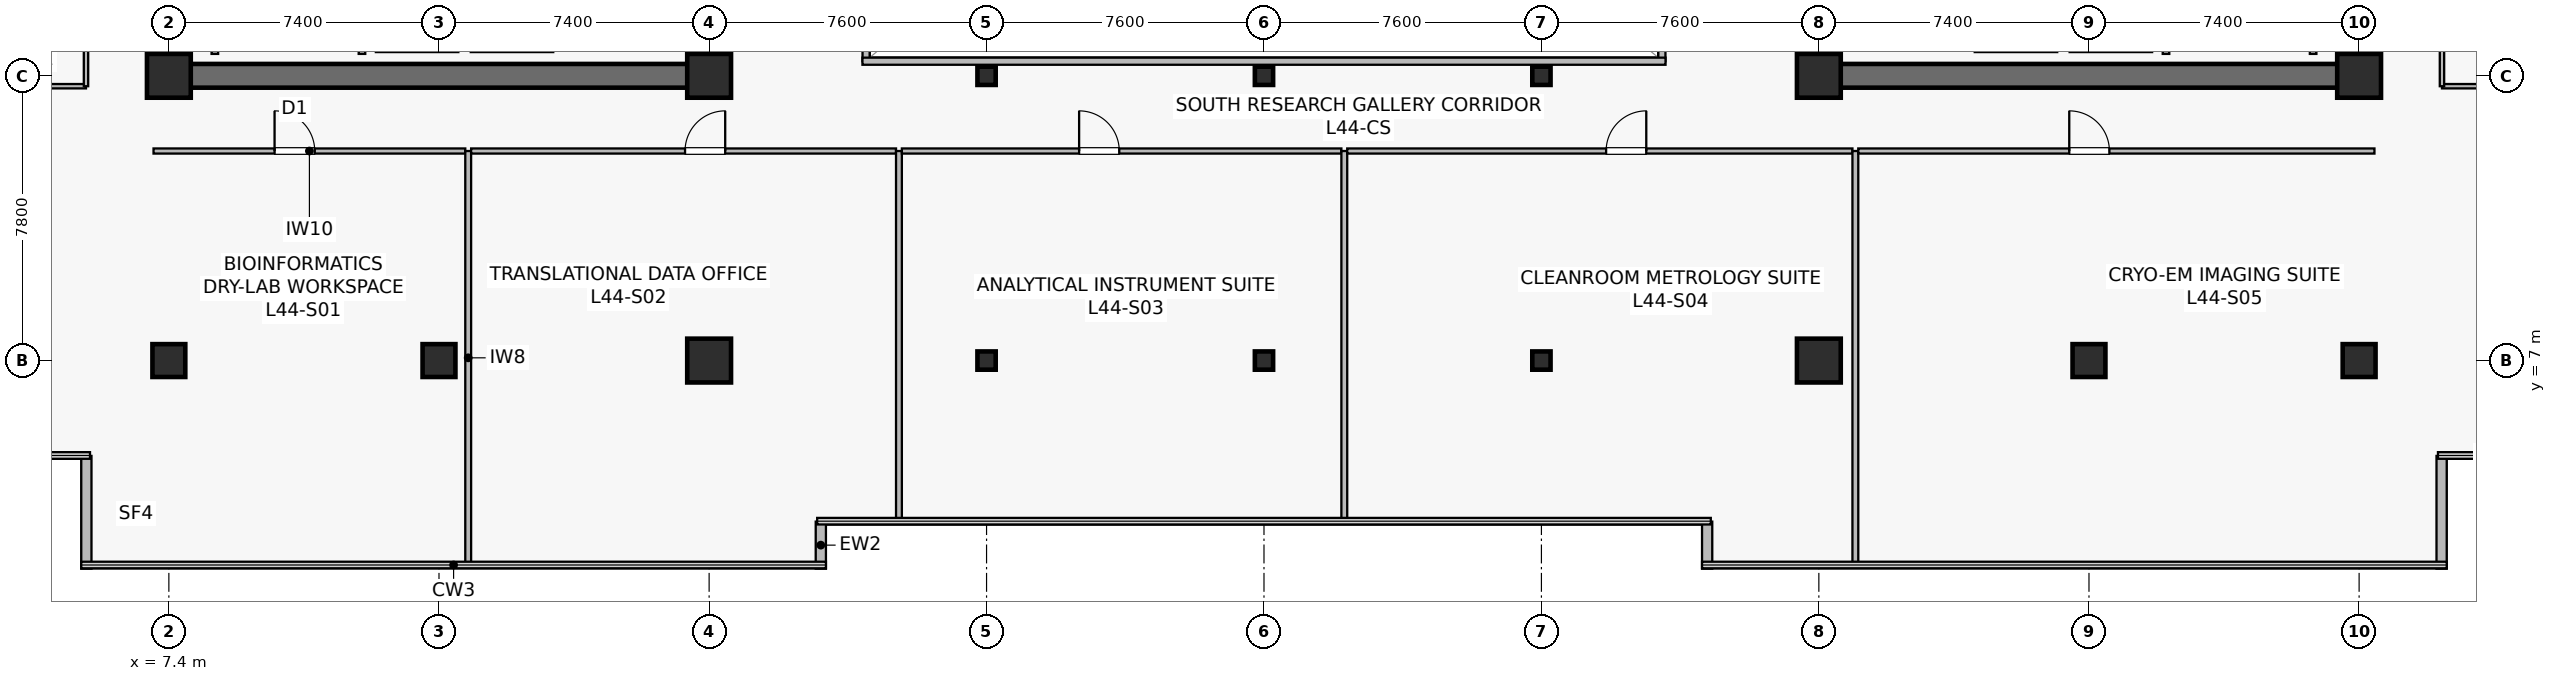
"""IFC4 building model, lengths in metres.
Left out: names, types, materials, properties, quantities, classifications, styles, units other than length and angle.
Written with IfcOpenShell. Run it as: python <this file> out.ifc"""

import sys

from ifc_helpers import new_model, si_unit, direction, frame, frame_2d, origin, origin_2d, place, context, subcontext, project, spatial, rectangle, hollow_rectangle, extrude, source, transform, mapped, element, fill, save


model = new_model("IFC4")
c1 = context("Model", 3, precision=1e-05, world=origin(), true_north=direction((0.0, 1.0)))
c2 = subcontext(c1, "Body", "Model", "MODEL_VIEW")
j1 = project(units=[si_unit("LENGTHUNIT", "METRE"), si_unit("PLANEANGLEUNIT", "RADIAN")], contexts=[c1])
p1 = place(None, origin())
s1 = spatial("IfcSite", under=j1, at=p1, CompositionType="ELEMENT")
p2 = place(p1, origin())
s2 = spatial("IfcBuilding", under=s1, at=p2, CompositionType="ELEMENT")
p3 = place(p2, frame((0.0, 0.0, 183.0)))
s3 = spatial("IfcBuildingStorey", under=s2, at=p3, CompositionType="ELEMENT", Elevation=183.0)
p4 = place(p3, frame((7.075, 14.8, 0.0), z_axis=(0.0, 0.0, 1.0), x_axis=(1.0, 0.0, 0.0)))
e1 = element("IfcWall", 1, at=p4, inside=s3, PredefinedType="SHEAR", context=c2, shape_type="SweptSolid", body=[
    extrude(rectangle(XDim=15.45, YDim=0.65, at=frame_2d((7.725, 0.0))), origin(), (0.0, 0.0, 1.0), 3.79),
])
p5 = place(p3, frame((7.4, 15.125, 0.0), z_axis=(0.0, 0.0, 1.0), x_axis=(0.0, 1.0, 0.0)))
e2 = element("IfcWall", 2, at=p5, inside=s3, PredefinedType="SHEAR", context=c2, shape_type="SweptSolid", body=[
    extrude(rectangle(XDim=18.35, YDim=0.65, at=frame_2d((9.175, 0.0))), origin(), (0.0, 0.0, 1.0), 3.79),
])
p6 = place(p3, frame((22.2, 15.125, 0.0), z_axis=(0.0, 0.0, 1.0), x_axis=(0.0, 1.0, 0.0)))
e3 = element("IfcWall", 3, at=p6, inside=s3, PredefinedType="SHEAR", context=c2, shape_type="SweptSolid", body=[
    extrude(rectangle(XDim=18.35, YDim=0.65, at=frame_2d((9.175, 0.0))), origin(), (0.0, 0.0, 1.0), 3.79),
])
p7 = place(p6, frame((3.425, 0.0, 0.0)))
e4 = element("IfcOpeningElement", 4, at=p7, cuts=e3, PredefinedType="OPENING", context=c2, shape_type="SweptSolid", body=[
    extrude(rectangle(XDim=1.42, YDim=2.2, at=frame_2d((0.71, 1.1))), frame((0.0, 0.335, 0.0), z_axis=(0.0, -1.0, 0.0), x_axis=(1.0, 0.0, 0.0)), (0.0, 0.0, 1.0), 0.67),
])
p8 = place(p3, frame((52.275, 14.8, 0.0), z_axis=(0.0, 0.0, 1.0), x_axis=(1.0, 0.0, 0.0)))
e5 = element("IfcWall", 5, at=p8, inside=s3, PredefinedType="SHEAR", context=c2, shape_type="SweptSolid", body=[
    extrude(rectangle(XDim=15.45, YDim=0.65, at=frame_2d((7.725, 0.0))), origin(), (0.0, 0.0, 1.0), 3.79),
])
p9 = place(p3, frame((52.6, 15.125, 0.0), z_axis=(0.0, 0.0, 1.0), x_axis=(0.0, 1.0, 0.0)))
e6 = element("IfcWall", 6, at=p9, inside=s3, PredefinedType="SHEAR", context=c2, shape_type="SweptSolid", body=[
    extrude(rectangle(XDim=18.35, YDim=0.65, at=frame_2d((9.175, 0.0))), origin(), (0.0, 0.0, 1.0), 3.79),
])
p10 = place(p9, frame((3.425, 0.0, 0.0)))
e7 = element("IfcOpeningElement", 7, at=p10, cuts=e6, PredefinedType="OPENING", context=c2, shape_type="SweptSolid", body=[
    extrude(rectangle(XDim=1.42, YDim=2.2, at=frame_2d((0.71, 1.1))), frame((0.0, 0.335, 0.0), z_axis=(0.0, -1.0, 0.0), x_axis=(1.0, 0.0, 0.0)), (0.0, 0.0, 1.0), 0.67),
])
p11 = place(p3, frame((67.4, 15.125, 0.0), z_axis=(0.0, 0.0, 1.0), x_axis=(0.0, 1.0, 0.0)))
e8 = element("IfcWall", 8, at=p11, inside=s3, PredefinedType="SHEAR", context=c2, shape_type="SweptSolid", body=[
    extrude(rectangle(XDim=18.35, YDim=0.65, at=frame_2d((9.175, 0.0))), origin(), (0.0, 0.0, 1.0), 3.79),
])
m1 = source(origin(), c2, "Body", "SweptSolid", [
    extrude(rectangle(XDim=0.9, YDim=0.9, at=origin_2d()), origin(), (0.0, 0.0, 1.0), 4.1),
])
p12 = place(p3, frame((14.8, 7.0, 0.0), z_axis=(0.0, 0.0, 1.0), x_axis=(1.0, 0.0, 0.0)))
e9 = element("IfcColumn", 9, at=p12, inside=s3, PredefinedType="COLUMN", context=c2, shape_type="MappedRepresentation", body=[
    mapped(m1, transform((0.0, 0.0, 0.0), scale=1.0)),
])
m2 = source(origin(), c2, "Body", "SweptSolid", [
    extrude(rectangle(XDim=1.2, YDim=1.2, at=origin_2d()), origin(), (0.0, 0.0, 1.0), 4.1),
])
for number, where, z_axis, x_axis in (
    (10, (22.2, 7.0, 0.0), (0.0, 0.0, 1.0), (1.0, 0.0, 0.0)),
    (11, (7.4, 14.8, 0.0), (0.0, 0.0, 1.0), (1.0, 0.0, 0.0)),
    (12, (22.2, 14.8, 0.0), (0.0, 0.0, 1.0), (1.0, 0.0, 0.0)),
    (13, (52.6, 7.0, 0.0), (0.0, 0.0, 1.0), (1.0, 0.0, 0.0)),
):
    element("IfcColumn", number, at=place(p3, frame(where, z_axis=z_axis, x_axis=x_axis)), inside=s3, PredefinedType="COLUMN", context=c2, shape_type="MappedRepresentation", body=[
        mapped(m2, transform((0.0, 0.0, 0.0), scale=1.0)),
    ])
p13 = place(p3, frame((60.0, 7.0, 0.0), z_axis=(0.0, 0.0, 1.0), x_axis=(1.0, 0.0, 0.0)))
e14 = element("IfcColumn", 14, at=p13, inside=s3, PredefinedType="COLUMN", context=c2, shape_type="MappedRepresentation", body=[
    mapped(m1, transform((0.0, 0.0, 0.0), scale=1.0)),
])
for number, where, z_axis, x_axis in (
    (15, (52.6, 14.8, 0.0), (0.0, 0.0, 1.0), (1.0, 0.0, 0.0)),
    (16, (67.4, 14.8, 0.0), (0.0, 0.0, 1.0), (1.0, 0.0, 0.0)),
):
    element("IfcColumn", number, at=place(p3, frame(where, z_axis=z_axis, x_axis=x_axis)), inside=s3, PredefinedType="COLUMN", context=c2, shape_type="MappedRepresentation", body=[
        mapped(m2, transform((0.0, 0.0, 0.0), scale=1.0)),
    ])
for number, where, z_axis, x_axis in (
    (17, (7.4, 7.0, 0.0), (0.0, 0.0, 1.0), (1.0, 0.0, 0.0)),
    (18, (67.4, 7.0, 0.0), (0.0, 0.0, 1.0), (1.0, 0.0, 0.0)),
):
    element("IfcColumn", number, at=place(p3, frame(where, z_axis=z_axis, x_axis=x_axis)), inside=s3, PredefinedType="COLUMN", context=c2, shape_type="MappedRepresentation", body=[
        mapped(m1, transform((0.0, 0.0, 0.0), scale=1.0)),
    ])
m3 = source(origin(), c2, "Body", "SweptSolid", [
    extrude(hollow_rectangle(XDim=0.5, YDim=0.5, WallThickness=0.022, at=origin_2d()), origin(), (0.0, 0.0, 1.0), 4.1),
])
for number, where, z_axis, x_axis in (
    (19, (29.8, 7.0, 0.0), (0.0, 0.0, 1.0), (1.0, 0.0, 0.0)),
    (20, (29.8, 14.8, 0.0), (0.0, 0.0, 1.0), (1.0, 0.0, 0.0)),
    (21, (37.4, 7.0, 0.0), (0.0, 0.0, 1.0), (1.0, 0.0, 0.0)),
    (22, (37.4, 14.8, 0.0), (0.0, 0.0, 1.0), (1.0, 0.0, 0.0)),
    (23, (45.0, 7.0, 0.0), (0.0, 0.0, 1.0), (1.0, 0.0, 0.0)),
    (24, (45.0, 14.8, 0.0), (0.0, 0.0, 1.0), (1.0, 0.0, 0.0)),
):
    element("IfcColumn", number, at=place(p3, frame(where, z_axis=z_axis, x_axis=x_axis)), inside=s3, PredefinedType="COLUMN", context=c2, shape_type="MappedRepresentation", body=[
        mapped(m3, transform((0.0, 0.0, 0.0), scale=1.0)),
    ])
for number, where, z_axis, x_axis in (
    (25, (25.26, 1.3, 0.0), (0.0, 0.0, 1.0), (0.0, 1.0, 0.0)),
    (26, (49.54, 2.588, 0.0), (0.0, 0.0, 1.0), (0.0, -1.0, 0.0)),
):
    element("IfcWall", number, at=place(p3, frame(where, z_axis=z_axis, x_axis=x_axis)), inside=s3, PredefinedType="STANDARD", context=c2, shape_type="SweptSolid", body=[
        extrude(rectangle(XDim=1.288, YDim=0.28, at=frame_2d((0.644, 0.0))), origin(), (0.0, 0.0, 1.0), 3.79),
    ])
for number, where, z_axis, x_axis in (
    (27, (69.66, 1.3, 0.0), (0.0, 0.0, 1.0), (0.0, 1.0, 0.0)),
    (28, (5.14, 4.388, 0.0), (0.0, 0.0, 1.0), (0.0, -1.0, 0.0)),
):
    element("IfcWall", number, at=place(p3, frame(where, z_axis=z_axis, x_axis=x_axis)), inside=s3, PredefinedType="STANDARD", context=c2, shape_type="SweptSolid", body=[
        extrude(rectangle(XDim=3.088, YDim=0.28, at=frame_2d((1.544, 0.0))), origin(), (0.0, 0.0, 1.0), 3.79),
    ])
p14 = place(p3, frame((13.07, 15.55, 0.0), z_axis=(0.0, 0.0, 1.0), x_axis=(1.0, 0.0, 0.0)))
e29 = element("IfcWall", 29, at=p14, inside=s3, PredefinedType="SOLIDWALL", context=c2, shape_type="SweptSolid", body=[
    extrude(rectangle(XDim=2.26, YDim=0.2, at=frame_2d((1.13, 0.0))), origin(), (0.0, 0.0, 1.0), 3.187),
])
p15 = place(p3, frame((15.67, 15.55, 0.0), z_axis=(0.0, 0.0, 1.0), x_axis=(1.0, 0.0, 0.0)))
e30 = element("IfcWall", 30, at=p15, inside=s3, PredefinedType="SOLIDWALL", context=c2, shape_type="SweptSolid", body=[
    extrude(rectangle(XDim=2.26, YDim=0.2, at=frame_2d((1.13, 0.0))), origin(), (0.0, 0.0, 1.0), 3.79),
])
for number, where, z_axis, x_axis in (
    (31, (12.69, 15.4, 0.0), (0.0, 0.0, 1.0), (0.0, 1.0, 0.0)),
    (32, (8.66, 15.4, 0.0), (0.0, 0.0, 1.0), (0.0, 1.0, 0.0)),
):
    element("IfcWall", number, at=place(p3, frame(where, z_axis=z_axis, x_axis=x_axis)), inside=s3, PredefinedType="SOLIDWALL", context=c2, shape_type="SweptSolid", body=[
        extrude(rectangle(XDim=2.4, YDim=0.18, at=frame_2d((1.2, 0.0))), origin(), (0.0, 0.0, 1.0), 3.79),
    ])
p16 = place(p3, frame((59.47, 15.55, 0.0), z_axis=(0.0, 0.0, 1.0), x_axis=(1.0, 0.0, 0.0)))
e33 = element("IfcWall", 33, at=p16, inside=s3, PredefinedType="SOLIDWALL", context=c2, shape_type="SweptSolid", body=[
    extrude(rectangle(XDim=2.26, YDim=0.2, at=frame_2d((1.13, 0.0))), origin(), (0.0, 0.0, 1.0), 3.187),
])
p17 = place(p3, frame((56.87, 15.55, 0.0), z_axis=(0.0, 0.0, 1.0), x_axis=(1.0, 0.0, 0.0)))
e34 = element("IfcWall", 34, at=p17, inside=s3, PredefinedType="SOLIDWALL", context=c2, shape_type="SweptSolid", body=[
    extrude(rectangle(XDim=2.26, YDim=0.2, at=frame_2d((1.13, 0.0))), origin(), (0.0, 0.0, 1.0), 3.79),
])
for number, where, z_axis, x_axis in (
    (35, (62.11, 15.4, 0.0), (0.0, 0.0, 1.0), (0.0, 1.0, 0.0)),
    (36, (66.14, 15.4, 0.0), (0.0, 0.0, 1.0), (0.0, 1.0, 0.0)),
):
    element("IfcWall", number, at=place(p3, frame(where, z_axis=z_axis, x_axis=x_axis)), inside=s3, PredefinedType="SOLIDWALL", context=c2, shape_type="SweptSolid", body=[
        extrude(rectangle(XDim=2.4, YDim=0.18, at=frame_2d((1.2, 0.0))), origin(), (0.0, 0.0, 1.0), 3.79),
    ])
p18 = place(p3, frame((26.5, 15.2, 0.0), z_axis=(0.0, 0.0, 1.0), x_axis=(0.0, 1.0, 0.0)))
e37 = element("IfcWall", 37, at=p18, inside=s3, PredefinedType="SOLIDWALL", context=c2, shape_type="SweptSolid", body=[
    extrude(rectangle(XDim=18.2, YDim=0.195, at=frame_2d((9.1, 0.0))), origin(), (0.0, 0.0, 1.0), 3.79),
])
p19 = place(p18, frame((1.8, 0.0, 0.9)))
e38 = element("IfcOpeningElement", 38, at=p19, cuts=e37, PredefinedType="OPENING", context=c2, shape_type="SweptSolid", body=[
    extrude(rectangle(XDim=1.5, YDim=1.4, at=frame_2d((0.75, 0.7))), frame((0.0, 0.107, 0.0), z_axis=(0.0, -1.0, 0.0), x_axis=(1.0, 0.0, 0.0)), (0.0, 0.0, 1.0), 0.215),
])
p20 = place(p18, frame((13.2, 0.0, 0.9)))
e39 = element("IfcOpeningElement", 39, at=p20, cuts=e37, PredefinedType="OPENING", context=c2, shape_type="SweptSolid", body=[
    extrude(rectangle(XDim=1.5, YDim=1.4, at=frame_2d((0.75, 0.7))), frame((0.0, 0.107, 0.0), z_axis=(0.0, -1.0, 0.0), x_axis=(1.0, 0.0, 0.0)), (0.0, 0.0, 1.0), 0.215),
])
p21 = place(p3, frame((48.3, 15.2, 0.0), z_axis=(0.0, 0.0, 1.0), x_axis=(0.0, 1.0, 0.0)))
e40 = element("IfcWall", 40, at=p21, inside=s3, PredefinedType="SOLIDWALL", context=c2, shape_type="SweptSolid", body=[
    extrude(rectangle(XDim=18.2, YDim=0.195, at=frame_2d((9.1, 0.0))), origin(), (0.0, 0.0, 1.0), 3.79),
])
p22 = place(p21, frame((1.8, 0.0, 0.9)))
e41 = element("IfcOpeningElement", 41, at=p22, cuts=e40, PredefinedType="OPENING", context=c2, shape_type="SweptSolid", body=[
    extrude(rectangle(XDim=1.5, YDim=1.4, at=frame_2d((0.75, 0.7))), frame((0.0, 0.107, 0.0), z_axis=(0.0, -1.0, 0.0), x_axis=(1.0, 0.0, 0.0)), (0.0, 0.0, 1.0), 0.215),
])
p23 = place(p21, frame((13.2, 0.0, 0.9)))
e42 = element("IfcOpeningElement", 42, at=p23, cuts=e40, PredefinedType="OPENING", context=c2, shape_type="SweptSolid", body=[
    extrude(rectangle(XDim=1.5, YDim=1.4, at=frame_2d((0.75, 0.7))), frame((0.0, 0.107, 0.0), z_axis=(0.0, -1.0, 0.0), x_axis=(1.0, 0.0, 0.0)), (0.0, 0.0, 1.0), 0.215),
])
p24 = place(p3, frame((26.4, 15.2, 0.0), z_axis=(0.0, 0.0, 1.0), x_axis=(1.0, 0.0, 0.0)))
e43 = element("IfcWall", 43, at=p24, inside=s3, PredefinedType="SOLIDWALL", context=c2, shape_type="SweptSolid", body=[
    extrude(rectangle(XDim=22.0, YDim=0.195, at=frame_2d((11.0, 0.0))), origin(), (0.0, 0.0, 1.0), 3.79),
])
p25 = place(p3, frame((6.98, 12.74, 0.0), z_axis=(0.0, 0.0, 1.0), x_axis=(1.0, 0.0, 0.0)))
e44 = element("IfcWall", 44, at=p25, inside=s3, PredefinedType="PARTITIONING", context=c2, shape_type="SweptSolid", body=[
    extrude(rectangle(XDim=8.54, YDim=0.14, at=frame_2d((4.27, 0.0))), origin(), (0.0, 0.0, 1.0), 3.187),
])
p26 = place(p25, frame((3.316, 0.0, 0.0)))
e45 = element("IfcOpeningElement", 45, at=p26, cuts=e44, PredefinedType="OPENING", context=c2, shape_type="SweptSolid", body=[
    extrude(rectangle(XDim=1.1, YDim=2.18, at=frame_2d((0.55, 1.09))), frame((0.0, 0.08, 0.0), z_axis=(0.0, -1.0, 0.0), x_axis=(1.0, 0.0, 0.0)), (0.0, 0.0, 1.0), 0.16),
])
p27 = place(p3, frame((15.6, 1.41, 0.0), z_axis=(0.0, 0.0, 1.0), x_axis=(0.0, 1.0, 0.0)))
e46 = element("IfcWall", 46, at=p27, inside=s3, PredefinedType="PARTITIONING", context=c2, shape_type="SweptSolid", body=[
    extrude(rectangle(XDim=11.33, YDim=0.16, at=frame_2d((5.665, 0.0))), origin(), (0.0, 0.0, 1.0), 3.075),
])
p28 = place(p3, frame((15.68, 12.74, 0.0), z_axis=(0.0, 0.0, 1.0), x_axis=(1.0, 0.0, 0.0)))
e47 = element("IfcWall", 47, at=p28, inside=s3, PredefinedType="PARTITIONING", context=c2, shape_type="SweptSolid", body=[
    extrude(rectangle(XDim=11.64, YDim=0.14, at=frame_2d((5.82, 0.0))), origin(), (0.0, 0.0, 1.0), 3.187),
])
p29 = place(p28, frame((5.86, 0.0, 0.0)))
e48 = element("IfcOpeningElement", 48, at=p29, cuts=e47, PredefinedType="OPENING", context=c2, shape_type="SweptSolid", body=[
    extrude(rectangle(XDim=1.1, YDim=2.18, at=frame_2d((0.55, 1.09))), frame((0.0, 0.08, 0.0), z_axis=(0.0, -1.0, 0.0), x_axis=(1.0, 0.0, 0.0)), (0.0, 0.0, 1.0), 0.16),
])
p30 = place(p3, frame((27.4, 2.61, 0.0), z_axis=(0.0, 0.0, 1.0), x_axis=(0.0, 1.0, 0.0)))
e49 = element("IfcWall", 49, at=p30, inside=s3, PredefinedType="PARTITIONING", context=c2, shape_type="SweptSolid", body=[
    extrude(rectangle(XDim=10.13, YDim=0.16, at=frame_2d((5.065, 0.0))), origin(), (0.0, 0.0, 1.0), 3.075),
])
p31 = place(p3, frame((27.48, 12.74, 0.0), z_axis=(0.0, 0.0, 1.0), x_axis=(1.0, 0.0, 0.0)))
e50 = element("IfcWall", 50, at=p31, inside=s3, PredefinedType="PARTITIONING", context=c2, shape_type="SweptSolid", body=[
    extrude(rectangle(XDim=12.04, YDim=0.14, at=frame_2d((6.02, 0.0))), origin(), (0.0, 0.0, 1.0), 3.187),
])
p32 = place(p31, frame((4.856, 0.0, 0.0)))
e51 = element("IfcOpeningElement", 51, at=p32, cuts=e50, PredefinedType="OPENING", context=c2, shape_type="SweptSolid", body=[
    extrude(rectangle(XDim=1.1, YDim=2.18, at=frame_2d((0.55, 1.09))), frame((0.0, 0.08, 0.0), z_axis=(0.0, -1.0, 0.0), x_axis=(1.0, 0.0, 0.0)), (0.0, 0.0, 1.0), 0.16),
])
p33 = place(p3, frame((39.6, 2.61, 0.0), z_axis=(0.0, 0.0, 1.0), x_axis=(0.0, 1.0, 0.0)))
e52 = element("IfcWall", 52, at=p33, inside=s3, PredefinedType="PARTITIONING", context=c2, shape_type="SweptSolid", body=[
    extrude(rectangle(XDim=10.13, YDim=0.16, at=frame_2d((5.065, 0.0))), origin(), (0.0, 0.0, 1.0), 3.075),
])
p34 = place(p3, frame((39.68, 12.74, 0.0), z_axis=(0.0, 0.0, 1.0), x_axis=(1.0, 0.0, 0.0)))
e53 = element("IfcWall", 53, at=p34, inside=s3, PredefinedType="PARTITIONING", context=c2, shape_type="SweptSolid", body=[
    extrude(rectangle(XDim=13.84, YDim=0.14, at=frame_2d((6.92, 0.0))), origin(), (0.0, 0.0, 1.0), 3.187),
])
p35 = place(p34, frame((7.092, 0.0, 0.0)))
e54 = element("IfcOpeningElement", 54, at=p35, cuts=e53, PredefinedType="OPENING", context=c2, shape_type="SweptSolid", body=[
    extrude(rectangle(XDim=1.1, YDim=2.18, at=frame_2d((0.55, 1.09))), frame((0.0, 0.08, 0.0), z_axis=(0.0, -1.0, 0.0), x_axis=(1.0, 0.0, 0.0)), (0.0, 0.0, 1.0), 0.16),
])
p36 = place(p3, frame((53.6, 1.41, 0.0), z_axis=(0.0, 0.0, 1.0), x_axis=(0.0, 1.0, 0.0)))
e55 = element("IfcWall", 55, at=p36, inside=s3, PredefinedType="PARTITIONING", context=c2, shape_type="SweptSolid", body=[
    extrude(rectangle(XDim=11.33, YDim=0.16, at=frame_2d((5.665, 0.0))), origin(), (0.0, 0.0, 1.0), 3.075),
])
p37 = place(p3, frame((53.68, 12.74, 0.0), z_axis=(0.0, 0.0, 1.0), x_axis=(1.0, 0.0, 0.0)))
e56 = element("IfcWall", 56, at=p37, inside=s3, PredefinedType="PARTITIONING", context=c2, shape_type="SweptSolid", body=[
    extrude(rectangle(XDim=14.14, YDim=0.14, at=frame_2d((7.07, 0.0))), origin(), (0.0, 0.0, 1.0), 3.187),
])
p38 = place(p37, frame((5.78, 0.0, 0.0)))
e57 = element("IfcOpeningElement", 57, at=p38, cuts=e56, PredefinedType="OPENING", context=c2, shape_type="SweptSolid", body=[
    extrude(rectangle(XDim=1.1, YDim=2.18, at=frame_2d((0.55, 1.09))), frame((0.0, 0.08, 0.0), z_axis=(0.0, -1.0, 0.0), x_axis=(1.0, 0.0, 0.0)), (0.0, 0.0, 1.0), 0.16),
])
p39 = place(p3, frame((2.11, 14.515, 0.0), z_axis=(0.0, 0.0, 1.0), x_axis=(1.0, 0.0, 0.0)))
e58 = element("IfcWall", 58, at=p39, inside=s3, PredefinedType="PARTITIONING", context=c2, shape_type="SweptSolid", body=[
    extrude(rectangle(XDim=3.02, YDim=0.12, at=frame_2d((1.51, 0.0))), origin(), (0.0, 0.0, 1.0), 3.79),
])
p40 = place(p3, frame((5.13, 14.515, 0.0), z_axis=(0.0, 0.0, 1.0), x_axis=(0.0, 1.0, 0.0)))
e59 = element("IfcWall", 59, at=p40, inside=s3, PredefinedType="PARTITIONING", context=c2, shape_type="SweptSolid", body=[
    extrude(rectangle(XDim=19.57, YDim=0.12, at=frame_2d((9.785, 0.0))), origin(), (0.0, 0.0, 1.0), 3.79),
])
p41 = place(p40, frame((9.335, 0.0, 0.0)))
e60 = element("IfcOpeningElement", 60, at=p41, cuts=e59, PredefinedType="OPENING", context=c2, shape_type="SweptSolid", body=[
    extrude(rectangle(XDim=0.9, YDim=2.1, at=frame_2d((0.45, 1.05))), frame((0.0, 0.07, 0.0), z_axis=(0.0, -1.0, 0.0), x_axis=(1.0, 0.0, 0.0)), (0.0, 0.0, 1.0), 0.14),
])
p42 = place(p3, frame((69.67, 14.515, 0.0), z_axis=(0.0, 0.0, 1.0), x_axis=(1.0, 0.0, 0.0)))
e61 = element("IfcWall", 61, at=p42, inside=s3, PredefinedType="PARTITIONING", context=c2, shape_type="SweptSolid", body=[
    extrude(rectangle(XDim=3.02, YDim=0.12, at=frame_2d((1.51, 0.0))), origin(), (0.0, 0.0, 1.0), 3.79),
])
p43 = place(p3, frame((69.67, 14.515, 0.0), z_axis=(0.0, 0.0, 1.0), x_axis=(0.0, 1.0, 0.0)))
e62 = element("IfcWall", 62, at=p43, inside=s3, PredefinedType="PARTITIONING", context=c2, shape_type="SweptSolid", body=[
    extrude(rectangle(XDim=9.025, YDim=0.12, at=frame_2d((4.513, 0.0))), origin(), (0.0, 0.0, 1.0), 3.79),
])
p44 = place(p43, frame((4.062, 0.0, 0.0)))
e63 = element("IfcOpeningElement", 63, at=p44, cuts=e62, PredefinedType="OPENING", context=c2, shape_type="SweptSolid", body=[
    extrude(rectangle(XDim=0.9, YDim=2.1, at=frame_2d((0.45, 1.05))), frame((0.0, 0.07, 0.0), z_axis=(0.0, -1.0, 0.0), x_axis=(1.0, 0.0, 0.0)), (0.0, 0.0, 1.0), 0.14),
])
m4 = source(origin(), c2, "Body", "SweptSolid", [
    extrude(rectangle(XDim=1.1, YDim=2.18, at=frame_2d((0.55, 1.09))), frame((0.0, 0.025, 0.0), z_axis=(0.0, -1.0, 0.0), x_axis=(1.0, 0.0, 0.0)), (0.0, 0.0, 1.0), 0.05),
])
p45 = place(p26, origin())
e64 = element("IfcDoor", 64, at=p45, inside=s3, OperationType="SINGLE_SWING_LEFT", PredefinedType="DOOR", context=c2, shape_type="MappedRepresentation", body=[
    mapped(m4, transform((0.0, 0.0, 0.0), scale=1.0)),
])
fill(e45, e64)
p46 = place(p29, origin())
e65 = element("IfcDoor", 65, at=p46, inside=s3, OperationType="SINGLE_SWING_RIGHT", PredefinedType="DOOR", context=c2, shape_type="MappedRepresentation", body=[
    mapped(m4, transform((0.0, 0.0, 0.0), scale=1.0)),
])
fill(e48, e65)
p47 = place(p32, origin())
e66 = element("IfcDoor", 66, at=p47, inside=s3, OperationType="SINGLE_SWING_LEFT", PredefinedType="DOOR", context=c2, shape_type="MappedRepresentation", body=[
    mapped(m4, transform((0.0, 0.0, 0.0), scale=1.0)),
])
fill(e51, e66)
p48 = place(p35, origin())
e67 = element("IfcDoor", 67, at=p48, inside=s3, OperationType="SINGLE_SWING_RIGHT", PredefinedType="DOOR", context=c2, shape_type="MappedRepresentation", body=[
    mapped(m4, transform((0.0, 0.0, 0.0), scale=1.0)),
])
fill(e54, e67)
p49 = place(p38, origin())
e68 = element("IfcDoor", 68, at=p49, inside=s3, OperationType="SINGLE_SWING_LEFT", PredefinedType="DOOR", context=c2, shape_type="MappedRepresentation", body=[
    mapped(m4, transform((0.0, 0.0, 0.0), scale=1.0)),
])
fill(e57, e68)
save(model, sys.argv[1])
